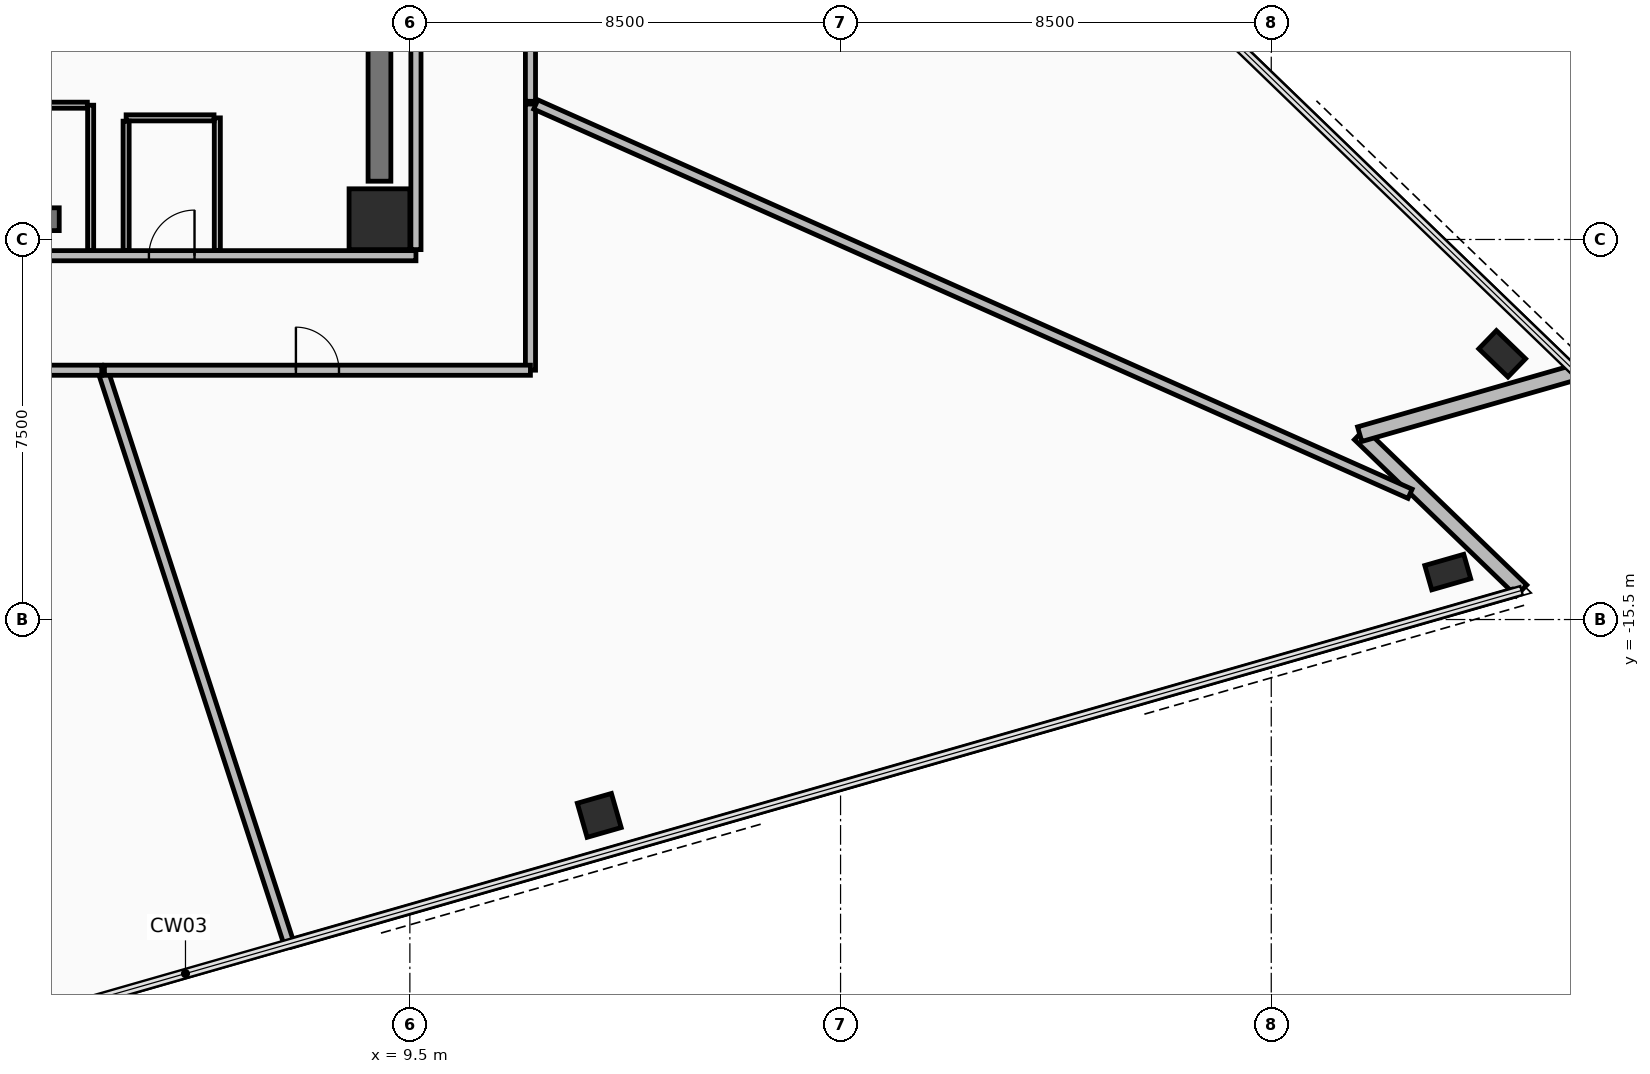
"""IFC4 building model, lengths in metres.
Left out: names, types, materials, properties, quantities, classifications, styles, units other than length and angle.
Written with IfcOpenShell. Run it as: python <this file> out.ifc"""

import sys

from ifc_helpers import new_model, si_unit, direction, frame, frame_2d, origin, origin_2d, place, context, subcontext, project, spatial, rectangle, hollow_rectangle, extrude, element, fill, save


model = new_model("IFC4")
c1 = context("Model", 3, precision=1e-05, world=origin(), true_north=direction((0.0, 1.0)))
c2 = subcontext(c1, "Body", "Model", "MODEL_VIEW")
j1 = project(units=[si_unit("LENGTHUNIT", "METRE"), si_unit("PLANEANGLEUNIT", "RADIAN")], contexts=[c1])
p1 = place(None, origin())
s1 = spatial("IfcSite", under=j1, at=p1, CompositionType="ELEMENT")
p2 = place(p1, origin())
s2 = spatial("IfcBuilding", under=s1, at=p2, CompositionType="ELEMENT")
p3 = place(p2, frame((0.0, 0.0, 96.9)))
s3 = spatial("IfcBuildingStorey", under=s2, at=p3, CompositionType="ELEMENT", Elevation=96.9)
p4 = place(p3, frame((8.9, -7.6, 0.0), z_axis=(0.0, 0.0, 1.0), x_axis=(1.0, 0.0, 0.0)))
e1 = element("IfcColumn", 1, at=p4, inside=s3, PredefinedType="COLUMN", context=c2, shape_type="SweptSolid", body=[
    extrude(rectangle(XDim=1.2, YDim=1.2, at=origin_2d()), origin(), (0.0, 0.0, 1.0), 3.6),
])
p5 = place(p3, frame((13.238, -19.365, 0.0), z_axis=(0.0, 0.0, 1.0), x_axis=(0.961261695938, 0.275637355817, 0.0)))
e2 = element("IfcColumn", 2, at=p5, inside=s3, PredefinedType="COLUMN", context=c2, shape_type="SweptSolid", body=[
    extrude(hollow_rectangle(XDim=0.7, YDim=0.7, WallThickness=0.04, at=origin_2d()), origin(), (0.0, 0.0, 1.0), 3.6),
])
for number, where, z_axis, x_axis in (
    (3, (29.983, -14.564, 0.0), (0.0, 0.0, 1.0), (0.961, 0.276, 0.0)),
    (4, (31.058, -10.256, 0.0), (0.0, 0.0, 1.0), (-0.719, 0.695, 0.0)),
):
    element("IfcColumn", number, at=place(p3, frame(where, z_axis=z_axis, x_axis=x_axis)), inside=s3, PredefinedType="COLUMN", context=c2, shape_type="SweptSolid", body=[
        extrude(hollow_rectangle(XDim=0.5, YDim=0.8, WallThickness=0.04, at=origin_2d()), origin(), (0.0, 0.0, 1.0), 3.6),
    ])
p6 = place(p3, frame((31.439, -14.927, 0.0), z_axis=(0.0, 0.0, 1.0), x_axis=(-0.719317126864, 0.694681848763, 0.0)))
e5 = element("IfcWall", 5, at=p6, inside=s3, PredefinedType="STANDARD", context=c2, shape_type="SweptSolid", body=[
    extrude(rectangle(XDim=4.44, YDim=0.3, at=frame_2d((2.22, 0.0))), origin(), (0.0, 0.0, 1.0), 2.605),
])
p7 = place(p3, frame((28.245, -11.842, 0.0), z_axis=(0.0, 0.0, 1.0), x_axis=(0.961255810825, 0.275657878821, 0.0)))
e6 = element("IfcWall", 6, at=p7, inside=s3, PredefinedType="STANDARD", context=c2, shape_type="SweptSolid", body=[
    extrude(rectangle(XDim=4.44, YDim=0.3, at=frame_2d((2.22, 0.0))), origin(), (0.0, 0.0, 1.0), 2.605),
])
p8 = place(p3, frame((-2.8, -7.6, 0.0), z_axis=(0.0, 0.0, 1.0), x_axis=(1.0, 0.0, 0.0)))
e7 = element("IfcWall", 7, at=p8, inside=s3, PredefinedType="SHEAR", context=c2, shape_type="SweptSolid", body=[
    extrude(rectangle(XDim=5.38, YDim=0.45, at=frame_2d((2.69, 0.0))), origin(), (0.0, 0.0, 1.0), 3.41),
])
p9 = place(p3, frame((8.9, -6.85, 0.0), z_axis=(0.0, 0.0, 1.0), x_axis=(0.0, 1.0, 0.0)))
e8 = element("IfcWall", 8, at=p9, inside=s3, PredefinedType="SHEAR", context=c2, shape_type="SweptSolid", body=[
    extrude(rectangle(XDim=10.7, YDim=0.45, at=frame_2d((5.35, 0.0))), origin(), (0.0, 0.0, 1.0), 3.41),
])
p10 = place(p3, frame((-9.62, -8.32, 0.0), z_axis=(0.0, 0.0, 1.0), x_axis=(1.0, 0.0, 0.0)))
e9 = element("IfcWall", 9, at=p10, inside=s3, PredefinedType="PARTITIONING", context=c2, shape_type="SweptSolid", body=[
    extrude(rectangle(XDim=19.24, YDim=0.2, at=frame_2d((9.62, 0.0))), origin(), (0.0, 0.0, 1.0), 2.805),
])
p11 = place(p10, frame((7.37, 0.0, 0.0)))
e10 = element("IfcOpeningElement", 10, at=p11, cuts=e9, PredefinedType="OPENING", context=c2, shape_type="SweptSolid", body=[
    extrude(rectangle(XDim=0.9, YDim=2.1, at=frame_2d((0.45, 1.05))), frame((0.0, 0.11, 0.0), z_axis=(0.0, -1.0, 0.0), x_axis=(1.0, 0.0, 0.0)), (0.0, 0.0, 1.0), 0.22),
])
p12 = place(p10, frame((10.77, 0.0, 0.0)))
e11 = element("IfcOpeningElement", 11, at=p12, cuts=e9, PredefinedType="OPENING", context=c2, shape_type="SweptSolid", body=[
    extrude(rectangle(XDim=0.9, YDim=2.1, at=frame_2d((0.45, 1.05))), frame((0.0, 0.11, 0.0), z_axis=(0.0, -1.0, 0.0), x_axis=(1.0, 0.0, 0.0)), (0.0, 0.0, 1.0), 0.22),
])
p13 = place(p10, frame((13.97, 0.0, 0.0)))
e12 = element("IfcOpeningElement", 12, at=p13, cuts=e9, PredefinedType="OPENING", context=c2, shape_type="SweptSolid", body=[
    extrude(rectangle(XDim=0.9, YDim=2.1, at=frame_2d((0.45, 1.05))), frame((0.0, 0.11, 0.0), z_axis=(0.0, -1.0, 0.0), x_axis=(1.0, 0.0, 0.0)), (0.0, 0.0, 1.0), 0.22),
])
p14 = place(p3, frame((9.62, -8.2, 0.0), z_axis=(0.0, 0.0, 1.0), x_axis=(0.0, 1.0, 0.0)))
e13 = element("IfcWall", 13, at=p14, inside=s3, PredefinedType="PARTITIONING", context=c2, shape_type="SweptSolid", body=[
    extrude(rectangle(XDim=16.4, YDim=0.2, at=frame_2d((8.2, 0.0))), origin(), (0.0, 0.0, 1.0), 2.805),
])
p15 = place(p14, frame((12.65, 0.0, 0.0)))
e14 = element("IfcOpeningElement", 14, at=p15, cuts=e13, PredefinedType="OPENING", context=c2, shape_type="SweptSolid", body=[
    extrude(rectangle(XDim=1.1, YDim=2.15, at=frame_2d((0.55, 1.075))), frame((0.0, 0.11, 0.0), z_axis=(0.0, -1.0, 0.0), x_axis=(1.0, 0.0, 0.0)), (0.0, 0.0, 1.0), 0.22),
])
p16 = place(p3, frame((3.2, -8.215, 0.0), z_axis=(0.0, 0.0, 1.0), x_axis=(0.0, 1.0, 0.0)))
e15 = element("IfcWall", 15, at=p16, inside=s3, PredefinedType="PARTITIONING", context=c2, shape_type="SweptSolid", body=[
    extrude(rectangle(XDim=2.865, YDim=0.12, at=frame_2d((1.433, 0.0))), origin(), (0.0, 0.0, 1.0), 2.605),
])
p17 = place(p3, frame((3.135, -5.35, 0.0), z_axis=(0.0, 0.0, 1.0), x_axis=(-1.0, 0.0, 0.0)))
e16 = element("IfcWall", 16, at=p17, inside=s3, PredefinedType="PARTITIONING", context=c2, shape_type="SweptSolid", body=[
    extrude(rectangle(XDim=3.135, YDim=0.12, at=frame_2d((1.567, 0.0))), origin(), (0.0, 0.0, 1.0), 3.41),
])
p18 = place(p3, frame((5.7, -8.215, 0.0), z_axis=(0.0, 0.0, 1.0), x_axis=(0.0, 1.0, 0.0)))
e17 = element("IfcWall", 17, at=p18, inside=s3, PredefinedType="PARTITIONING", context=c2, shape_type="SweptSolid", body=[
    extrude(rectangle(XDim=2.615, YDim=0.12, at=frame_2d((1.308, 0.0))), origin(), (0.0, 0.0, 1.0), 2.605),
])
p19 = place(p3, frame((5.635, -5.6, 0.0), z_axis=(0.0, 0.0, 1.0), x_axis=(-1.0, 0.0, 0.0)))
e18 = element("IfcWall", 18, at=p19, inside=s3, PredefinedType="PARTITIONING", context=c2, shape_type="SweptSolid", body=[
    extrude(rectangle(XDim=1.735, YDim=0.12, at=frame_2d((0.868, 0.0))), origin(), (0.0, 0.0, 1.0), 3.41),
])
p20 = place(p3, frame((3.9, -5.665, 0.0), z_axis=(0.0, 0.0, 1.0), x_axis=(0.0, -1.0, 0.0)))
e19 = element("IfcWall", 19, at=p20, inside=s3, PredefinedType="PARTITIONING", context=c2, shape_type="SweptSolid", body=[
    extrude(rectangle(XDim=2.55, YDim=0.12, at=frame_2d((1.275, 0.0))), origin(), (0.0, 0.0, 1.0), 2.605),
])
p21 = place(p3, frame((11.88, -10.579, 0.0), z_axis=(0.0, 0.0, 1.0), x_axis=(0.0, 1.0, 0.0)))
e20 = element("IfcWall", 20, at=p21, inside=s3, PredefinedType="PARTITIONING", context=c2, shape_type="SweptSolid", body=[
    extrude(rectangle(XDim=5.251, YDim=0.2, at=frame_2d((2.626, 0.0))), origin(), (0.0, 0.0, 1.0), 2.805),
])
p22 = place(p3, frame((11.985, -5.336, 0.0), z_axis=(0.0, 0.0, 1.0), x_axis=(0.913548038419, -0.406730846507, 0.0)))
e21 = element("IfcWall", 21, at=p22, inside=s3, PredefinedType="PARTITIONING", context=c2, shape_type="SweptSolid", body=[
    extrude(rectangle(XDim=18.887, YDim=0.2, at=frame_2d((9.444, 0.0))), origin(), (0.0, 0.0, 1.0), 2.805),
])
p23 = place(p3, frame((31.267, -14.976, 0.0), z_axis=(0.0, 0.0, 1.0), x_axis=(-0.961260697891, -0.275640836396, 0.0)))
e22 = element("IfcWall", 22, at=p23, inside=s3, PredefinedType="PARTITIONING", context=c2, shape_type="SweptSolid", body=[
    extrude(rectangle(XDim=25.1, YDim=0.15, at=frame_2d((12.55, 0.0))), origin(), (0.0, 0.0, 1.0), 3.41),
])
p24 = place(p3, frame((7.109, -21.878, 0.0), z_axis=(0.0, 0.0, 1.0), x_axis=(-0.309027348364, 0.951053152018, 0.0)))
e23 = element("IfcWall", 23, at=p24, inside=s3, PredefinedType="PARTITIONING", context=c2, shape_type="SweptSolid", body=[
    extrude(rectangle(XDim=11.845, YDim=0.2, at=frame_2d((5.922, 0.0))), origin(), (0.0, 0.0, 1.0), 2.605),
])
p25 = place(p3, frame((3.472, -10.58, 0.0), z_axis=(0.0, 0.0, 1.0), x_axis=(1.0, 0.0, 0.0)))
e24 = element("IfcWall", 24, at=p25, inside=s3, PredefinedType="PARTITIONING", context=c2, shape_type="SweptSolid", body=[
    extrude(rectangle(XDim=8.407, YDim=0.2, at=frame_2d((4.204, 0.0))), origin(), (0.0, 0.0, 1.0), 2.805),
])
p26 = place(p25, frame((3.779, 0.0, 0.0)))
e25 = element("IfcOpeningElement", 25, at=p26, cuts=e24, PredefinedType="OPENING", context=c2, shape_type="SweptSolid", body=[
    extrude(rectangle(XDim=0.85, YDim=2.1, at=frame_2d((0.425, 1.05))), frame((0.0, 0.11, 0.0), z_axis=(0.0, -1.0, 0.0), x_axis=(1.0, 0.0, 0.0)), (0.0, 0.0, 1.0), 0.22),
])
p27 = place(p3, frame((-5.85, -10.58, 0.0), z_axis=(0.0, 0.0, 1.0), x_axis=(1.0, 0.0, 0.0)))
e26 = element("IfcWall", 26, at=p27, inside=s3, PredefinedType="PARTITIONING", context=c2, shape_type="SweptSolid", body=[
    extrude(rectangle(XDim=9.269, YDim=0.2, at=frame_2d((4.635, 0.0))), origin(), (0.0, 0.0, 1.0), 2.805),
])
p28 = place(p27, frame((4.135, 0.0, 0.0)))
e27 = element("IfcOpeningElement", 27, at=p28, cuts=e26, PredefinedType="OPENING", context=c2, shape_type="SweptSolid", body=[
    extrude(rectangle(XDim=1.0, YDim=2.15, at=frame_2d((0.5, 1.075))), frame((0.0, 0.11, 0.0), z_axis=(0.0, -1.0, 0.0), x_axis=(1.0, 0.0, 0.0)), (0.0, 0.0, 1.0), 0.22),
])
p29 = place(p3, frame((11.88, -5.273, 0.0), z_axis=(0.0, 0.0, 1.0), x_axis=(0.0, 1.0, 0.0)))
e28 = element("IfcWall", 28, at=p29, inside=s3, PredefinedType="PARTITIONING", context=c2, shape_type="SweptSolid", body=[
    extrude(rectangle(XDim=14.58, YDim=0.2, at=frame_2d((7.29, 0.0))), origin(), (0.0, 0.0, 1.0), 2.605),
])
p30 = place(p29, frame((6.84, 0.0, 0.0)))
e29 = element("IfcOpeningElement", 29, at=p30, cuts=e28, PredefinedType="OPENING", context=c2, shape_type="SweptSolid", body=[
    extrude(rectangle(XDim=0.9, YDim=2.1, at=frame_2d((0.45, 1.05))), frame((0.0, 0.11, 0.0), z_axis=(0.0, -1.0, 0.0), x_axis=(1.0, 0.0, 0.0)), (0.0, 0.0, 1.0), 0.22),
])
p31 = place(p13, frame((0.9, 0.0, 0.0), z_axis=(0.0, 0.0, 1.0), x_axis=(-1.0, 0.0, 0.0)))
e30 = element("IfcDoor", 30, at=p31, inside=s3, OperationType="SINGLE_SWING_LEFT", PredefinedType="DOOR", context=c2, shape_type="SweptSolid", body=[
    extrude(rectangle(XDim=0.9, YDim=2.1, at=frame_2d((0.45, 1.05))), frame((0.0, 0.025, 0.0), z_axis=(0.0, -1.0, 0.0), x_axis=(1.0, 0.0, 0.0)), (0.0, 0.0, 1.0), 0.05),
])
fill(e12, e30)
p32 = place(p26, origin())
e31 = element("IfcDoor", 31, at=p32, inside=s3, OperationType="SINGLE_SWING_RIGHT", PredefinedType="DOOR", context=c2, shape_type="SweptSolid", body=[
    extrude(rectangle(XDim=0.85, YDim=2.1, at=frame_2d((0.425, 1.05))), frame((0.0, 0.025, 0.0), z_axis=(0.0, -1.0, 0.0), x_axis=(1.0, 0.0, 0.0)), (0.0, 0.0, 1.0), 0.05),
])
fill(e25, e31)
save(model, sys.argv[1])
